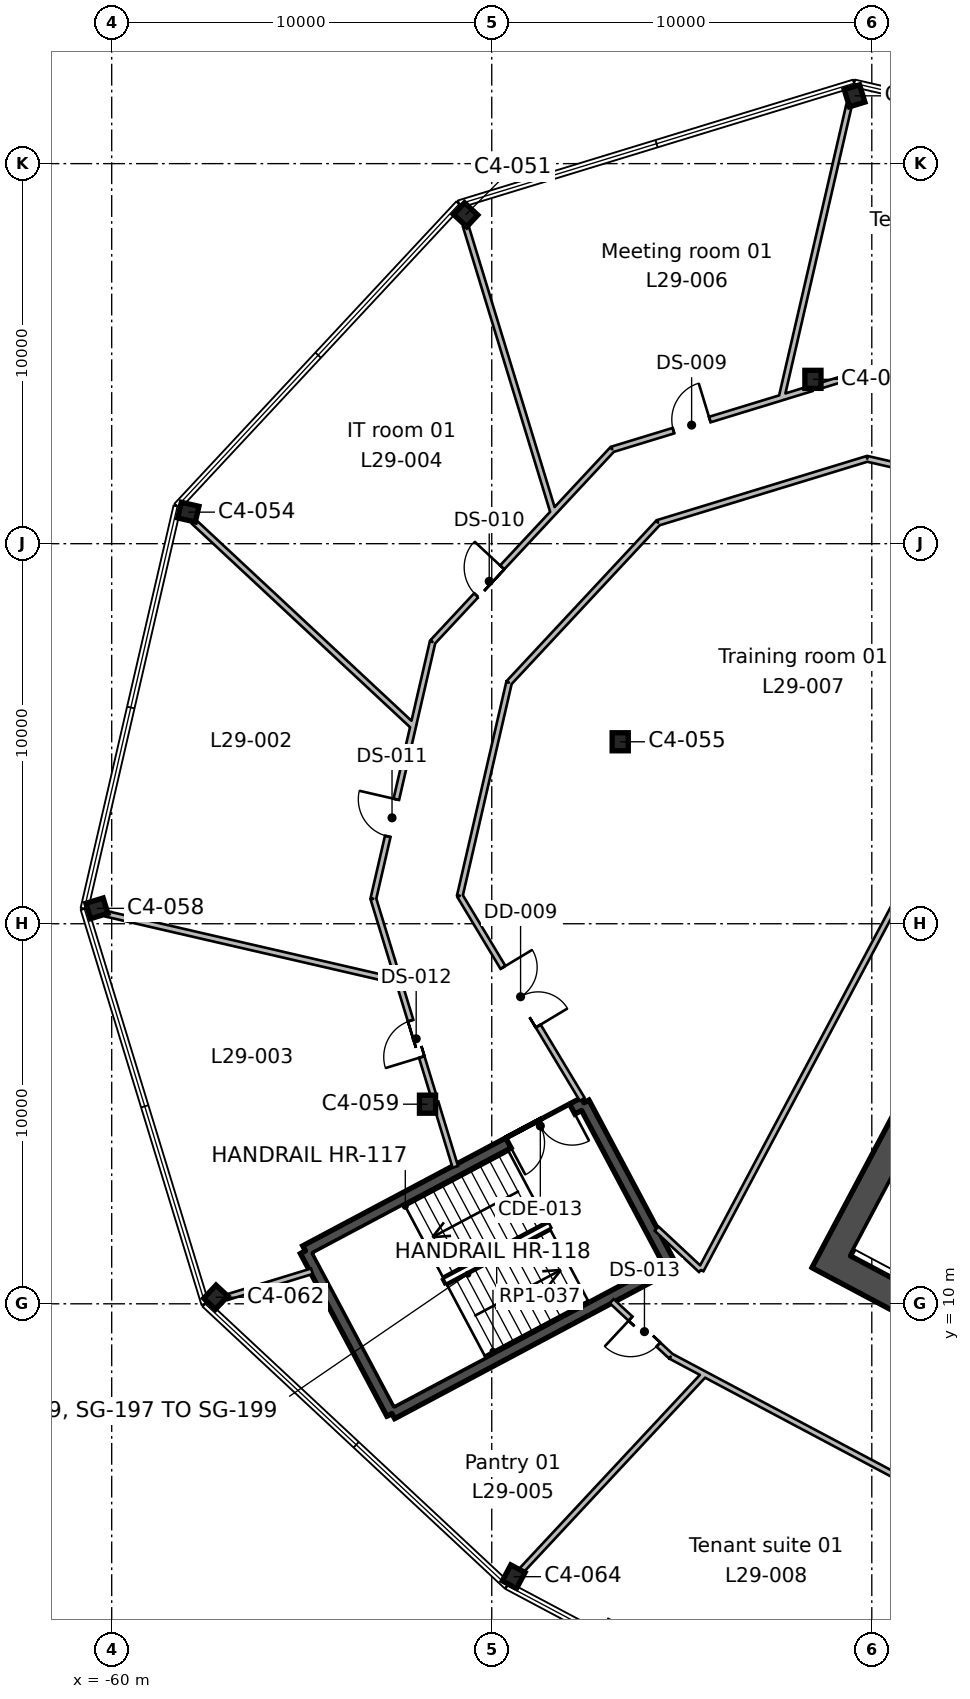
"""IFC4 building model, lengths in metres.
Left out: names, types, materials, properties, quantities, classifications, styles, units other than length and angle.
Written with IfcOpenShell. Run it as: python <this file> out.ifc"""

import sys

from ifc_helpers import new_model, si_unit, direction, frame, frame_2d, origin, origin_2d, place, context, subcontext, project, spatial, rectangle, i_section, extrude, element, fill, save


model = new_model("IFC4")
c1 = context("Model", 3, precision=1e-05, world=origin(), true_north=direction((0.0, 1.0)))
c2 = subcontext(c1, "Body", "Model", "MODEL_VIEW")
j1 = project(units=[si_unit("LENGTHUNIT", "METRE"), si_unit("PLANEANGLEUNIT", "RADIAN")], contexts=[c1])
p1 = place(None, origin())
s1 = spatial("IfcSite", under=j1, at=p1, CompositionType="ELEMENT")
p2 = place(p1, origin())
s2 = spatial("IfcBuilding", under=s1, at=p2, CompositionType="ELEMENT")
p3 = place(p2, frame((0.0, 0.0, 142.2)))
s3 = spatial("IfcBuildingStorey", under=s2, at=p3, CompositionType="ELEMENT", Elevation=142.2)
for number, where, z_axis, x_axis in (
    (1, (-49.423, 2.82, 0.0), (0.0, 0.0, 1.0), (0.883, -0.469, 0.0)),
    (2, (-57.262, 10.173, 0.0), (0.0, 0.0, 1.0), (0.731, -0.682, 0.0)),
    (3, (-51.69, 15.252, 0.0), (0.0, 0.0, 1.0), (1.0, 0.0, 0.0)),
    (4, (-60.39, 20.405, 0.0), (0.0, 0.0, 1.0), (0.292, -0.956, 0.0)),
    (5, (-46.62, 24.788, 0.0), (0.0, 0.0, 1.0), (1.0, 0.0, 0.0)),
    (6, (-57.983, 30.83, 0.0), (0.0, 0.0, 1.0), (-0.225, -0.974, 0.0)),
    (7, (-41.549, 34.324, 0.0), (0.0, 0.0, 1.0), (1.0, 0.0, 0.0)),
    (8, (-50.686, 38.655, 0.0), (0.0, 0.0, 1.0), (-0.682, -0.731, 0.0)),
    (9, (-40.454, 41.784, 0.0), (0.0, 0.0, 1.0), (-0.956, -0.292, 0.0)),
):
    element("IfcColumn", number, at=place(p3, frame(where, z_axis=z_axis, x_axis=x_axis)), inside=s3, PredefinedType="COLUMN", context=c2, shape_type="SweptSolid", body=[
        extrude(i_section(OverallWidth=0.424, OverallDepth=0.475, WebThickness=0.048, FlangeThickness=0.077, FilletRadius=0.015, at=origin_2d()), origin(), (0.0, 0.0, 1.0), 4.0),
    ])
p4 = place(p3, frame((-31.996, 28.168, 0.0), z_axis=(0.0, 0.0, 1.0), x_axis=(-0.469479580143, -0.882943329908, 0.0)))
e10 = element("IfcWall", 10, at=p4, inside=s3, PredefinedType="SHEAR", context=c2, shape_type="SweptSolid", body=[
    extrude(rectangle(XDim=19.7, YDim=0.75, at=frame_2d((9.85, 0.0))), origin(), (0.0, 0.0, 1.0), 4.0),
])
p5 = place(p4, frame((10.45, 0.0, 0.0)))
e11 = element("IfcOpeningElement", 11, at=p5, cuts=e10, PredefinedType="OPENING", context=c2, shape_type="SweptSolid", body=[
    extrude(rectangle(XDim=2.4, YDim=2.4, at=frame_2d((1.2, 1.2))), frame((0.0, 0.385, 0.0), z_axis=(0.0, -1.0, 0.0), x_axis=(1.0, 0.0, 0.0)), (0.0, 0.0, 1.0), 0.77),
])
p6 = place(p3, frame((-22.902, 1.446, 0.0), z_axis=(0.0, 0.0, 1.0), x_axis=(-0.88294509198, 0.469476266226, 0.0)))
e12 = element("IfcWall", 12, at=p6, inside=s3, PredefinedType="SHEAR", context=c2, shape_type="SweptSolid", body=[
    extrude(rectangle(XDim=20.2, YDim=0.75, at=frame_2d((10.1, 0.0))), origin(), (0.0, 0.0, 1.0), 4.0),
])
p7 = place(p3, frame((-47.574, 15.29, 0.0), z_axis=(0.0, 0.0, 1.0), x_axis=(0.469443498566, -0.882962514297, 0.0)))
e13 = element("IfcWall", 13, at=p7, inside=s3, PredefinedType="SHEAR", context=c2, shape_type="SweptSolid", body=[
    extrude(rectangle(XDim=4.85, YDim=0.3, at=frame_2d((2.425, 0.0))), origin(), (0.0, 0.0, 1.0), 4.0),
])
p8 = place(p3, frame((-45.297, 11.007, 0.0), z_axis=(0.0, 0.0, 1.0), x_axis=(-0.882951519127, -0.469464178475, 0.0)))
e14 = element("IfcWall", 14, at=p8, inside=s3, PredefinedType="SHEAR", context=c2, shape_type="SweptSolid", body=[
    extrude(rectangle(XDim=8.3, YDim=0.3, at=frame_2d((4.15, 0.0))), origin(), (0.0, 0.0, 1.0), 4.0),
])
p9 = place(p3, frame((-52.626, 7.111, 0.0), z_axis=(0.0, 0.0, 1.0), x_axis=(-0.469464364128, 0.882951420416, 0.0)))
e15 = element("IfcWall", 15, at=p9, inside=s3, PredefinedType="SHEAR", context=c2, shape_type="SweptSolid", body=[
    extrude(rectangle(XDim=4.85, YDim=0.3, at=frame_2d((2.425, 0.0))), origin(), (0.0, 0.0, 1.0), 4.0),
])
p10 = place(p3, frame((-54.903, 11.393, 0.0), z_axis=(0.0, 0.0, 1.0), x_axis=(0.882939326045, 0.469487110071, 0.0)))
e16 = element("IfcWall", 16, at=p10, inside=s3, PredefinedType="SHEAR", context=c2, shape_type="SweptSolid", body=[
    extrude(rectangle(XDim=8.3, YDim=0.3, at=frame_2d((4.15, 0.0))), origin(), (0.0, 0.0, 1.0), 4.0),
])
p11 = place(p10, frame((6.05, 0.0, 0.0)))
e17 = element("IfcOpeningElement", 17, at=p11, cuts=e16, PredefinedType="OPENING", context=c2, shape_type="SweptSolid", body=[
    extrude(rectangle(XDim=1.9, YDim=2.1, at=frame_2d((0.95, 1.05))), frame((0.0, 0.16, 0.0), z_axis=(0.0, -1.0, 0.0), x_axis=(1.0, 0.0, 0.0)), (0.0, 0.0, 1.0), 0.32),
])
p12 = place(p3, frame((-52.45, 18.484, 0.0), z_axis=(0.0, 0.0, 1.0), x_axis=(-0.974348948829, 0.225042498023, 0.0)))
e18 = element("IfcWall", 18, at=p12, inside=s3, PredefinedType="PARTITIONING", context=c2, shape_type="SweptSolid", body=[
    extrude(rectangle(XDim=7.892, YDim=0.15, at=frame_2d((3.946, 0.0))), origin(), (0.0, 0.0, 1.0), 3.64),
])
p13 = place(p3, frame((-57.841, 30.58, 0.0), z_axis=(0.0, 0.0, 1.0), x_axis=(0.731373012185, -0.681977651428, 0.0)))
e19 = element("IfcWall", 19, at=p13, inside=s3, PredefinedType="PARTITIONING", context=c2, shape_type="SweptSolid", body=[
    extrude(rectangle(XDim=7.893, YDim=0.15, at=frame_2d((3.947, 0.0))), origin(), (0.0, 0.0, 1.0), 3.64),
])
p14 = place(p3, frame((-54.732, 10.857, 0.0), z_axis=(0.0, 0.0, 1.0), x_axis=(-0.956196980242, -0.292723991119, 0.0)))
e20 = element("IfcWall", 20, at=p14, inside=s3, PredefinedType="PARTITIONING", context=c2, shape_type="SweptSolid", body=[
    extrude(rectangle(XDim=2.344, YDim=0.15, at=frame_2d((1.172, 0.0))), origin(), (0.0, 0.0, 1.0), 3.64),
])
p15 = place(p3, frame((-52.056, 25.246, 0.0), z_axis=(0.0, 0.0, 1.0), x_axis=(-0.224961765576, -0.97436759184, 0.0)))
e21 = element("IfcWall", 21, at=p15, inside=s3, PredefinedType="PARTITIONING", context=c2, shape_type="SweptSolid", body=[
    extrude(rectangle(XDim=4.708, YDim=0.15, at=frame_2d((2.354, 0.0))), origin(), (0.0, 0.0, 1.0), 3.64),
])
p16 = place(p15, frame((2.024, 0.0, 0.0)))
e22 = element("IfcOpeningElement", 22, at=p16, cuts=e21, PredefinedType="OPENING", context=c2, shape_type="SweptSolid", body=[
    extrude(rectangle(XDim=1.0, YDim=2.1, at=frame_2d((0.5, 1.05))), frame((0.0, 0.085, 0.0), z_axis=(0.0, -1.0, 0.0), x_axis=(1.0, 0.0, 0.0)), (0.0, 0.0, 1.0), 0.17),
])
p17 = place(p3, frame((-53.115, 20.659, 0.0), z_axis=(0.0, 0.0, 1.0), x_axis=(0.292062202153, -0.956399325634, 0.0)))
e23 = element("IfcWall", 23, at=p17, inside=s3, PredefinedType="PARTITIONING", context=c2, shape_type="SweptSolid", body=[
    extrude(rectangle(XDim=2.222, YDim=0.15, at=frame_2d((1.111, 0.0))), origin(), (0.0, 0.0, 1.0), 3.64),
])
p18 = place(p3, frame((-50.959, 13.604, 0.0), z_axis=(0.0, 0.0, 1.0), x_axis=(-0.292326826569, 0.95631847544, 0.0)))
e24 = element("IfcWall", 24, at=p18, inside=s3, PredefinedType="PARTITIONING", context=c2, shape_type="SweptSolid", body=[
    extrude(rectangle(XDim=1.776, YDim=0.15, at=frame_2d((0.888, 0.0))), origin(), (0.0, 0.0, 1.0), 3.64),
])
p19 = place(p3, frame((-51.535, 15.49, 0.0), z_axis=(0.0, 0.0, 1.0), x_axis=(-0.292522494411, 0.956258641929, 0.0)))
e25 = element("IfcWall", 25, at=p19, inside=s3, PredefinedType="PARTITIONING", context=c2, shape_type="SweptSolid", body=[
    extrude(rectangle(XDim=3.183, YDim=0.15, at=frame_2d((1.592, 0.0))), origin(), (0.0, 0.0, 1.0), 3.64),
])
p20 = place(p19, frame((1.05, 0.0, 0.0)))
e26 = element("IfcOpeningElement", 26, at=p20, cuts=e25, PredefinedType="OPENING", context=c2, shape_type="SweptSolid", body=[
    extrude(rectangle(XDim=1.0, YDim=2.1, at=frame_2d((0.5, 1.05))), frame((0.0, 0.085, 0.0), z_axis=(0.0, -1.0, 0.0), x_axis=(1.0, 0.0, 0.0)), (0.0, 0.0, 1.0), 0.17),
])
p21 = place(p3, frame((-48.345, 30.856, 0.0), z_axis=(0.0, 0.0, 1.0), x_axis=(-0.682044743799, -0.731310445335, 0.0)))
e27 = element("IfcWall", 27, at=p21, inside=s3, PredefinedType="PARTITIONING", context=c2, shape_type="SweptSolid", body=[
    extrude(rectangle(XDim=4.708, YDim=0.15, at=frame_2d((2.354, 0.0))), origin(), (0.0, 0.0, 1.0), 3.64),
])
p22 = place(p21, frame((2.024, 0.0, 0.0)))
e28 = element("IfcOpeningElement", 28, at=p22, cuts=e27, PredefinedType="OPENING", context=c2, shape_type="SweptSolid", body=[
    extrude(rectangle(XDim=1.0, YDim=2.1, at=frame_2d((0.5, 1.05))), frame((0.0, 0.085, 0.0), z_axis=(0.0, -1.0, 0.0), x_axis=(1.0, 0.0, 0.0)), (0.0, 0.0, 1.0), 0.17),
])
p23 = place(p3, frame((-51.556, 27.413, 0.0), z_axis=(0.0, 0.0, 1.0), x_axis=(-0.225019992363, -0.974354146621, 0.0)))
e29 = element("IfcWall", 29, at=p23, inside=s3, PredefinedType="PARTITIONING", context=c2, shape_type="SweptSolid", body=[
    extrude(rectangle(XDim=2.222, YDim=0.15, at=frame_2d((1.111, 0.0))), origin(), (0.0, 0.0, 1.0), 3.64),
])
p24 = place(p3, frame((-50.688, 38.366, 0.0), z_axis=(0.0, 0.0, 1.0), x_axis=(0.292463739097, -0.956276613388, 0.0)))
e30 = element("IfcWall", 30, at=p24, inside=s3, PredefinedType="PARTITIONING", context=c2, shape_type="SweptSolid", body=[
    extrude(rectangle(XDim=7.892, YDim=0.15, at=frame_2d((3.946, 0.0))), origin(), (0.0, 0.0, 1.0), 3.64),
])
p25 = place(p3, frame((-44.402, 8.149, 0.0), z_axis=(0.0, 0.0, 1.0), x_axis=(-0.682039957921, -0.731314908777, 0.0)))
e31 = element("IfcWall", 31, at=p25, inside=s3, PredefinedType="PARTITIONING", context=c2, shape_type="SweptSolid", body=[
    extrude(rectangle(XDim=7.065, YDim=0.15, at=frame_2d((3.533, 0.0))), origin(), (0.0, 0.0, 1.0), 3.64),
])
p26 = place(p3, frame((-36.752, 4.082, 0.0), z_axis=(0.0, 0.0, 1.0), x_axis=(-0.46955237308, -0.88290462052, 0.0)))
e32 = element("IfcWall", 32, at=p26, inside=s3, PredefinedType="PARTITIONING", context=c2, shape_type="SweptSolid", body=[
    extrude(rectangle(XDim=7.55, YDim=0.15, at=frame_2d((3.775, 0.0))), origin(), (0.0, 0.0, 1.0), 3.64),
])
p27 = place(p3, frame((-42.326, 33.858, 0.0), z_axis=(0.0, 0.0, 1.0), x_axis=(-0.956351168554, -0.292219852858, 0.0)))
e33 = element("IfcWall", 33, at=p27, inside=s3, PredefinedType="PARTITIONING", context=c2, shape_type="SweptSolid", body=[
    extrude(rectangle(XDim=4.709, YDim=0.15, at=frame_2d((2.354, 0.0))), origin(), (0.0, 0.0, 1.0), 3.64),
])
p28 = place(p27, frame((2.025, 0.0, 0.0)))
e34 = element("IfcOpeningElement", 34, at=p28, cuts=e33, PredefinedType="OPENING", context=c2, shape_type="SweptSolid", body=[
    extrude(rectangle(XDim=1.0, YDim=2.1, at=frame_2d((0.5, 1.05))), frame((0.0, 0.085, 0.0), z_axis=(0.0, -1.0, 0.0), x_axis=(1.0, 0.0, 0.0)), (0.0, 0.0, 1.0), 0.17),
])
p29 = place(p3, frame((-46.829, 32.482, 0.0), z_axis=(0.0, 0.0, 1.0), x_axis=(-0.681891349178, -0.731453476249, 0.0)))
e35 = element("IfcWall", 35, at=p29, inside=s3, PredefinedType="PARTITIONING", context=c2, shape_type="SweptSolid", body=[
    extrude(rectangle(XDim=2.222, YDim=0.15, at=frame_2d((1.111, 0.0))), origin(), (0.0, 0.0, 1.0), 3.64),
])
p30 = place(p3, frame((-47.619, 15.379, 0.0), z_axis=(0.0, 0.0, 1.0), x_axis=(-0.515052665436, 0.857158533661, 0.0)))
e36 = element("IfcWall", 36, at=p30, inside=s3, PredefinedType="PARTITIONING", context=c2, shape_type="SweptSolid", body=[
    extrude(rectangle(XDim=6.252, YDim=0.15, at=frame_2d((3.126, 0.0))), origin(), (0.0, 0.0, 1.0), 3.64),
])
p31 = place(p30, frame((2.25, 0.0, 0.0)))
e37 = element("IfcOpeningElement", 37, at=p31, cuts=e36, PredefinedType="OPENING", context=c2, shape_type="SweptSolid", body=[
    extrude(rectangle(XDim=1.8, YDim=2.1, at=frame_2d((0.9, 1.05))), frame((0.0, 0.085, 0.0), z_axis=(0.0, -1.0, 0.0), x_axis=(1.0, 0.0, 0.0)), (0.0, 0.0, 1.0), 0.17),
])
p32 = place(p3, frame((-50.839, 20.738, 0.0), z_axis=(0.0, 0.0, 1.0), x_axis=(0.224943182107, 0.974371882201, 0.0)))
e38 = element("IfcWall", 38, at=p32, inside=s3, PredefinedType="PARTITIONING", context=c2, shape_type="SweptSolid", body=[
    extrude(rectangle(XDim=5.753, YDim=0.15, at=frame_2d((2.877, 0.0))), origin(), (0.0, 0.0, 1.0), 3.64),
])
p33 = place(p3, frame((-49.545, 26.344, 0.0), z_axis=(0.0, 0.0, 1.0), x_axis=(0.681973388481, 0.731376987199, 0.0)))
e39 = element("IfcWall", 39, at=p33, inside=s3, PredefinedType="PARTITIONING", context=c2, shape_type="SweptSolid", body=[
    extrude(rectangle(XDim=5.752, YDim=0.15, at=frame_2d((2.876, 0.0))), origin(), (0.0, 0.0, 1.0), 3.64),
])
p34 = place(p3, frame((-45.622, 30.551, 0.0), z_axis=(0.0, 0.0, 1.0), x_axis=(0.956315986812, 0.292334967747, 0.0)))
e40 = element("IfcWall", 40, at=p34, inside=s3, PredefinedType="PARTITIONING", context=c2, shape_type="SweptSolid", body=[
    extrude(rectangle(XDim=5.753, YDim=0.15, at=frame_2d((2.876, 0.0))), origin(), (0.0, 0.0, 1.0), 3.64),
])
p35 = place(p3, frame((-40.12, 32.233, 0.0), z_axis=(0.0, 0.0, 1.0), x_axis=(0.97436665742, -0.224965812754, 0.0)))
e41 = element("IfcWall", 41, at=p35, inside=s3, PredefinedType="PARTITIONING", context=c2, shape_type="SweptSolid", body=[
    extrude(rectangle(XDim=6.374, YDim=0.15, at=frame_2d((3.187, 0.0))), origin(), (0.0, 0.0, 1.0), 3.64),
])
p36 = place(p3, frame((-33.91, 30.799, 0.0), z_axis=(0.0, 0.0, 1.0), x_axis=(-0.469481348016, -0.88294238989, 0.0)))
e42 = element("IfcWall", 42, at=p36, inside=s3, PredefinedType="PARTITIONING", context=c2, shape_type="SweptSolid", body=[
    extrude(rectangle(XDim=22.549, YDim=0.15, at=frame_2d((11.274, 0.0))), origin(), (0.0, 0.0, 1.0), 3.64),
])
p37 = place(p3, frame((-44.496, 10.89, 0.0), z_axis=(0.0, 0.0, 1.0), x_axis=(-0.731080698145, 0.682291003018, 0.0)))
e43 = element("IfcWall", 43, at=p37, inside=s3, PredefinedType="PARTITIONING", context=c2, shape_type="SweptSolid", body=[
    extrude(rectangle(XDim=1.596, YDim=0.15, at=frame_2d((0.798, 0.0))), origin(), (0.0, 0.0, 1.0), 3.64),
])
p38 = place(p3, frame((-44.462, 8.181, 0.0), z_axis=(0.0, 0.0, 1.0), x_axis=(-0.882750253305, 0.469842516478, 0.0)))
e44 = element("IfcWall", 44, at=p38, inside=s3, PredefinedType="PARTITIONING", context=c2, shape_type="SweptSolid", body=[
    extrude(rectangle(XDim=0.935, YDim=0.15, at=frame_2d((0.467, 0.0))), origin(), (0.0, 0.0, 1.0), 3.64),
])
p39 = place(p3, frame((-45.287, 8.62, 0.0), z_axis=(0.0, 0.0, 1.0), x_axis=(-0.731593637228, 0.681740969846, 0.0)))
e45 = element("IfcWall", 45, at=p39, inside=s3, PredefinedType="PARTITIONING", context=c2, shape_type="SweptSolid", body=[
    extrude(rectangle(XDim=2.125, YDim=0.15, at=frame_2d((1.063, 0.0))), origin(), (0.0, 0.0, 1.0), 3.64),
])
p40 = place(p39, frame((0.45, 0.0, 0.0)))
e46 = element("IfcOpeningElement", 46, at=p40, cuts=e45, PredefinedType="OPENING", context=c2, shape_type="SweptSolid", body=[
    extrude(rectangle(XDim=1.0, YDim=2.1, at=frame_2d((0.5, 1.05))), frame((0.0, 0.085, 0.0), z_axis=(0.0, -1.0, 0.0), x_axis=(1.0, 0.0, 0.0)), (0.0, 0.0, 1.0), 0.17),
])
p41 = place(p3, frame((-13.6, -8.228, 0.0), z_axis=(0.0, 0.0, 1.0), x_axis=(-0.882954510497, 0.469458552369, 0.0)))
e47 = element("IfcWall", 47, at=p41, inside=s3, PredefinedType="PARTITIONING", context=c2, shape_type="SweptSolid", body=[
    extrude(rectangle(XDim=34.953, YDim=0.15, at=frame_2d((17.477, 0.0))), origin(), (0.0, 0.0, 1.0), 3.64),
])
p42 = place(p41, frame((26.45, 0.0, 0.0)))
e48 = element("IfcOpeningElement", 48, at=p42, cuts=e47, PredefinedType="OPENING", context=c2, shape_type="SweptSolid", body=[
    extrude(rectangle(XDim=1.0, YDim=2.1, at=frame_2d((0.5, 1.05))), frame((0.0, 0.085, 0.0), z_axis=(0.0, -1.0, 0.0), x_axis=(1.0, 0.0, 0.0)), (0.0, 0.0, 1.0), 0.17),
])
p43 = place(p41, frame((16.55, 0.0, 0.0)))
e49 = element("IfcOpeningElement", 49, at=p43, cuts=e47, PredefinedType="OPENING", context=c2, shape_type="SweptSolid", body=[
    extrude(rectangle(XDim=1.8, YDim=2.1, at=frame_2d((0.9, 1.05))), frame((0.0, 0.085, 0.0), z_axis=(0.0, -1.0, 0.0), x_axis=(1.0, 0.0, 0.0)), (0.0, 0.0, 1.0), 0.17),
])
p44 = place(p3, frame((-40.599, 41.534, 0.0), z_axis=(0.0, 0.0, 1.0), x_axis=(-0.225013130649, -0.974355731258, 0.0)))
e50 = element("IfcWall", 50, at=p44, inside=s3, PredefinedType="PARTITIONING", context=c2, shape_type="SweptSolid", body=[
    extrude(rectangle(XDim=7.892, YDim=0.15, at=frame_2d((3.946, 0.0))), origin(), (0.0, 0.0, 1.0), 3.64),
])
p45 = place(p3, frame((-34.677, 33.234, 0.0), z_axis=(0.0, 0.0, 1.0), x_axis=(-0.974367234575, 0.224963312978, 0.0)))
e51 = element("IfcWall", 51, at=p45, inside=s3, PredefinedType="PARTITIONING", context=c2, shape_type="SweptSolid", body=[
    extrude(rectangle(XDim=5.668, YDim=0.15, at=frame_2d((2.834, 0.0))), origin(), (0.0, 0.0, 1.0), 3.64),
])
p46 = place(p45, frame((2.35, 0.0, 0.0)))
e52 = element("IfcOpeningElement", 52, at=p46, cuts=e51, PredefinedType="OPENING", context=c2, shape_type="SweptSolid", body=[
    extrude(rectangle(XDim=1.0, YDim=2.1, at=frame_2d((0.5, 1.05))), frame((0.0, 0.085, 0.0), z_axis=(0.0, -1.0, 0.0), x_axis=(1.0, 0.0, 0.0)), (0.0, 0.0, 1.0), 0.17),
])
p47 = place(p3, frame((-40.2, 34.509, 0.0), z_axis=(0.0, 0.0, 1.0), x_axis=(-0.956177669283, -0.29278706386, 0.0)))
e53 = element("IfcWall", 53, at=p47, inside=s3, PredefinedType="PARTITIONING", context=c2, shape_type="SweptSolid", body=[
    extrude(rectangle(XDim=1.189, YDim=0.15, at=frame_2d((0.594, 0.0))), origin(), (0.0, 0.0, 1.0), 3.64),
])
p48 = place(p3, frame((-41.582, 34.087, 0.0), z_axis=(0.0, 0.0, 1.0), x_axis=(-0.956187735772, -0.292754186919, 0.0)))
e54 = element("IfcWall", 54, at=p48, inside=s3, PredefinedType="PARTITIONING", context=c2, shape_type="SweptSolid", body=[
    extrude(rectangle(XDim=0.799, YDim=0.15, at=frame_2d((0.399, 0.0))), origin(), (0.0, 0.0, 1.0), 3.64),
])
p49 = place(p11, frame((1.9, 0.0, 0.0), z_axis=(0.0, 0.0, 1.0), x_axis=(-1.0, 0.0, 0.0)))
e55 = element("IfcDoor", 55, at=p49, inside=s3, OperationType="DOUBLE_DOOR_SINGLE_SWING", PredefinedType="DOOR", context=c2, shape_type="SweptSolid", body=[
    extrude(rectangle(XDim=1.9, YDim=2.1, at=frame_2d((0.95, 1.05))), frame((0.0, 0.025, 0.0), z_axis=(0.0, -1.0, 0.0), x_axis=(1.0, 0.0, 0.0)), (0.0, 0.0, 1.0), 0.05),
])
fill(e17, e55)
p50 = place(p31, frame((1.8, 0.0, 0.0), z_axis=(0.0, 0.0, 1.0), x_axis=(-1.0, 0.0, 0.0)))
e56 = element("IfcDoor", 56, at=p50, inside=s3, OperationType="DOUBLE_DOOR_SINGLE_SWING", PredefinedType="DOOR", context=c2, shape_type="SweptSolid", body=[
    extrude(rectangle(XDim=1.8, YDim=2.1, at=frame_2d((0.9, 1.05))), frame((0.0, 0.025, 0.0), z_axis=(0.0, -1.0, 0.0), x_axis=(1.0, 0.0, 0.0)), (0.0, 0.0, 1.0), 0.05),
])
fill(e37, e56)
p51 = place(p28, frame((1.0, 0.0, 0.0), z_axis=(0.0, 0.0, 1.0), x_axis=(-1.0, 0.0, 0.0)))
e57 = element("IfcDoor", 57, at=p51, inside=s3, OperationType="SINGLE_SWING_RIGHT", PredefinedType="DOOR", context=c2, shape_type="SweptSolid", body=[
    extrude(rectangle(XDim=1.0, YDim=2.1, at=frame_2d((0.5, 1.05))), frame((0.0, 0.025, 0.0), z_axis=(0.0, -1.0, 0.0), x_axis=(1.0, 0.0, 0.0)), (0.0, 0.0, 1.0), 0.05),
])
fill(e34, e57)
p52 = place(p22, frame((1.0, 0.0, 0.0), z_axis=(0.0, 0.0, 1.0), x_axis=(-1.0, 0.0, 0.0)))
e58 = element("IfcDoor", 58, at=p52, inside=s3, OperationType="SINGLE_SWING_RIGHT", PredefinedType="DOOR", context=c2, shape_type="SweptSolid", body=[
    extrude(rectangle(XDim=1.0, YDim=2.1, at=frame_2d((0.5, 1.05))), frame((0.0, 0.025, 0.0), z_axis=(0.0, -1.0, 0.0), x_axis=(1.0, 0.0, 0.0)), (0.0, 0.0, 1.0), 0.05),
])
fill(e28, e58)
p53 = place(p16, frame((1.0, 0.0, 0.0), z_axis=(0.0, 0.0, 1.0), x_axis=(-1.0, 0.0, 0.0)))
e59 = element("IfcDoor", 59, at=p53, inside=s3, OperationType="SINGLE_SWING_RIGHT", PredefinedType="DOOR", context=c2, shape_type="SweptSolid", body=[
    extrude(rectangle(XDim=1.0, YDim=2.1, at=frame_2d((0.5, 1.05))), frame((0.0, 0.025, 0.0), z_axis=(0.0, -1.0, 0.0), x_axis=(1.0, 0.0, 0.0)), (0.0, 0.0, 1.0), 0.05),
])
fill(e22, e59)
p54 = place(p20, origin())
e60 = element("IfcDoor", 60, at=p54, inside=s3, OperationType="SINGLE_SWING_LEFT", PredefinedType="DOOR", context=c2, shape_type="SweptSolid", body=[
    extrude(rectangle(XDim=1.0, YDim=2.1, at=frame_2d((0.5, 1.05))), frame((0.0, 0.025, 0.0), z_axis=(0.0, -1.0, 0.0), x_axis=(1.0, 0.0, 0.0)), (0.0, 0.0, 1.0), 0.05),
])
fill(e26, e60)
p55 = place(p40, origin())
e61 = element("IfcDoor", 61, at=p55, inside=s3, OperationType="SINGLE_SWING_RIGHT", PredefinedType="DOOR", context=c2, shape_type="SweptSolid", body=[
    extrude(rectangle(XDim=1.0, YDim=2.1, at=frame_2d((0.5, 1.05))), frame((0.0, 0.025, 0.0), z_axis=(0.0, -1.0, 0.0), x_axis=(1.0, 0.0, 0.0)), (0.0, 0.0, 1.0), 0.05),
])
fill(e46, e61)
save(model, sys.argv[1])
